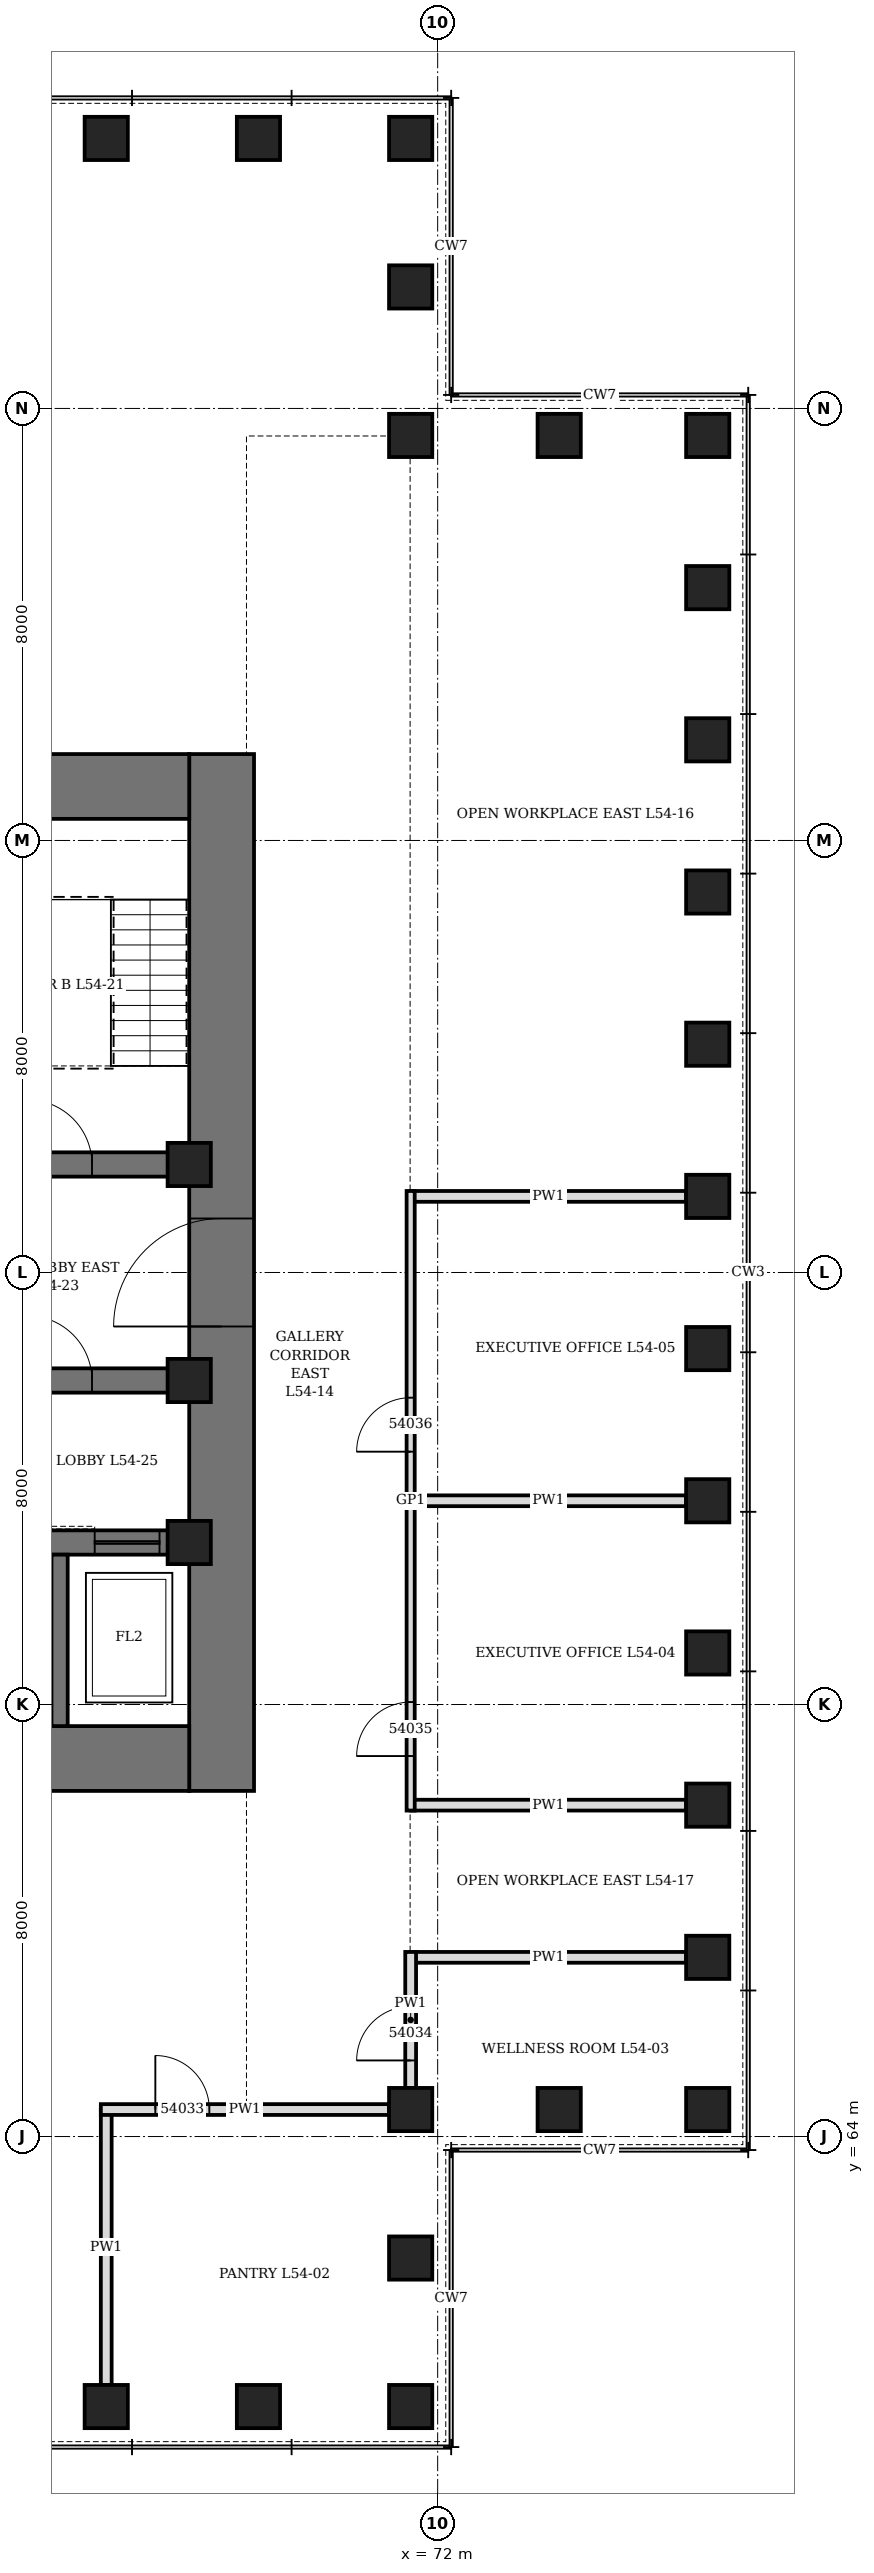
"""IFC4 building model, lengths in metres.
Left out: names, types, materials, properties, quantities, classifications, styles, units other than length and angle.
Written with IfcOpenShell. Run it as: python <this file> out.ifc"""

import sys

from ifc_helpers import new_model, si_unit, direction, frame, frame_2d, origin, origin_2d, place, context, subcontext, project, spatial, rectangle, hollow_rectangle, extrude, element, fill, save


model = new_model("IFC4")
c1 = context("Model", 3, precision=1e-05, world=origin(), true_north=direction((0.0, 1.0)))
c2 = subcontext(c1, "Body", "Model", "MODEL_VIEW")
j1 = project(units=[si_unit("LENGTHUNIT", "METRE"), si_unit("PLANEANGLEUNIT", "RADIAN")], contexts=[c1])
p1 = place(None, origin())
s1 = spatial("IfcSite", under=j1, at=p1, CompositionType="ELEMENT")
p2 = place(p1, origin())
s2 = spatial("IfcBuilding", under=s1, at=p2, CompositionType="ELEMENT")
p3 = place(p2, frame((0.0, 0.0, 240.1)))
s3 = spatial("IfcBuildingStorey", under=s2, at=p3, CompositionType="ELEMENT", Elevation=240.1)
for number, where, z_axis, x_axis in (
    (1, (65.864, 59.0, 0.0), (0.0, 0.0, 1.0), (1.0, 0.0, 0.0)),
    (2, (68.682, 59.0, 0.0), (0.0, 0.0, 1.0), (1.0, 0.0, 0.0)),
    (3, (71.5, 59.0, 0.0), (0.0, 0.0, 1.0), (0.0, 1.0, 0.0)),
    (4, (71.5, 61.75, 0.0), (0.0, 0.0, 1.0), (0.0, 1.0, 0.0)),
    (5, (71.5, 64.5, 0.0), (0.0, 0.0, 1.0), (1.0, 0.0, 0.0)),
    (6, (74.25, 64.5, 0.0), (0.0, 0.0, 1.0), (1.0, 0.0, 0.0)),
    (7, (77.0, 64.5, 0.0), (0.0, 0.0, 1.0), (0.0, 1.0, 0.0)),
    (8, (77.0, 67.318, 0.0), (0.0, 0.0, 1.0), (0.0, 1.0, 0.0)),
    (9, (77.0, 70.136, 0.0), (0.0, 0.0, 1.0), (0.0, 1.0, 0.0)),
    (10, (77.0, 72.955, 0.0), (0.0, 0.0, 1.0), (0.0, 1.0, 0.0)),
    (11, (77.0, 75.773, 0.0), (0.0, 0.0, 1.0), (0.0, 1.0, 0.0)),
    (12, (77.0, 78.591, 0.0), (0.0, 0.0, 1.0), (0.0, 1.0, 0.0)),
    (13, (77.0, 81.409, 0.0), (0.0, 0.0, 1.0), (0.0, 1.0, 0.0)),
    (14, (77.0, 84.227, 0.0), (0.0, 0.0, 1.0), (0.0, 1.0, 0.0)),
    (15, (77.0, 87.045, 0.0), (0.0, 0.0, 1.0), (0.0, 1.0, 0.0)),
    (16, (77.0, 89.864, 0.0), (0.0, 0.0, 1.0), (0.0, 1.0, 0.0)),
    (17, (77.0, 92.682, 0.0), (0.0, 0.0, 1.0), (0.0, 1.0, 0.0)),
    (18, (77.0, 95.5, 0.0), (0.0, 0.0, 1.0), (1.0, 0.0, 0.0)),
    (19, (74.25, 95.5, 0.0), (0.0, 0.0, 1.0), (1.0, 0.0, 0.0)),
    (20, (71.5, 95.5, 0.0), (0.0, 0.0, 1.0), (0.0, 1.0, 0.0)),
    (21, (71.5, 98.25, 0.0), (0.0, 0.0, 1.0), (0.0, 1.0, 0.0)),
    (22, (71.5, 101.0, 0.0), (0.0, 0.0, 1.0), (1.0, 0.0, 0.0)),
    (23, (68.682, 101.0, 0.0), (0.0, 0.0, 1.0), (1.0, 0.0, 0.0)),
    (24, (65.864, 101.0, 0.0), (0.0, 0.0, 1.0), (1.0, 0.0, 0.0)),
):
    element("IfcColumn", number, at=place(p3, frame(where, z_axis=z_axis, x_axis=x_axis)), inside=s3, PredefinedType="COLUMN", context=c2, shape_type="SweptSolid", body=[
        extrude(hollow_rectangle(XDim=0.8, YDim=0.8, WallThickness=0.08, at=origin_2d()), origin(), (0.0, 0.0, 1.0), 4.2),
    ])
p4 = place(p3, frame((68.0, 70.4, 0.0), z_axis=(0.0, 0.0, 1.0), x_axis=(0.0, 1.0, 0.0)))
e25 = element("IfcWall", 25, at=p4, inside=s3, PredefinedType="SHEAR", context=c2, shape_type="SweptSolid", body=[
    extrude(rectangle(XDim=19.2, YDim=1.2, at=frame_2d((9.6, 0.0))), origin(), (0.0, 0.0, 1.0), 4.2),
])
p5 = place(p4, frame((8.6, 0.0, 0.0)))
e26 = element("IfcOpeningElement", 26, at=p5, cuts=e25, PredefinedType="OPENING", context=c2, shape_type="SweptSolid", body=[
    extrude(rectangle(XDim=2.0, YDim=2.4, at=frame_2d((1.0, 1.2))), frame((0.0, 0.61, 0.0), z_axis=(0.0, -1.0, 0.0), x_axis=(1.0, 0.0, 0.0)), (0.0, 0.0, 1.0), 1.22),
])
p6 = place(p3, frame((44.6, 71.0, 0.0), z_axis=(0.0, 0.0, 1.0), x_axis=(1.0, 0.0, 0.0)))
e27 = element("IfcWall", 27, at=p6, inside=s3, PredefinedType="SHEAR", context=c2, shape_type="SweptSolid", body=[
    extrude(rectangle(XDim=22.8, YDim=1.2, at=frame_2d((11.4, 0.0))), origin(), (0.0, 0.0, 1.0), 4.2),
])
p7 = place(p6, frame((6.35, 0.0, 0.0)))
e28 = element("IfcOpeningElement", 28, at=p7, cuts=e27, PredefinedType="OPENING", context=c2, shape_type="SweptSolid", body=[
    extrude(rectangle(XDim=1.1, YDim=2.2, at=frame_2d((0.55, 1.1))), frame((0.0, 0.61, 0.0), z_axis=(0.0, -1.0, 0.0), x_axis=(1.0, 0.0, 0.0)), (0.0, 0.0, 1.0), 1.22),
])
p8 = place(p6, frame((9.35, 0.0, 0.0)))
e29 = element("IfcOpeningElement", 29, at=p8, cuts=e27, PredefinedType="OPENING", context=c2, shape_type="SweptSolid", body=[
    extrude(rectangle(XDim=1.1, YDim=2.2, at=frame_2d((0.55, 1.1))), frame((0.0, 0.61, 0.0), z_axis=(0.0, -1.0, 0.0), x_axis=(1.0, 0.0, 0.0)), (0.0, 0.0, 1.0), 1.22),
])
p9 = place(p6, frame((12.35, 0.0, 0.0)))
e30 = element("IfcOpeningElement", 30, at=p9, cuts=e27, PredefinedType="OPENING", context=c2, shape_type="SweptSolid", body=[
    extrude(rectangle(XDim=1.1, YDim=2.2, at=frame_2d((0.55, 1.1))), frame((0.0, 0.61, 0.0), z_axis=(0.0, -1.0, 0.0), x_axis=(1.0, 0.0, 0.0)), (0.0, 0.0, 1.0), 1.22),
])
p10 = place(p6, frame((15.35, 0.0, 0.0)))
e31 = element("IfcOpeningElement", 31, at=p10, cuts=e27, PredefinedType="OPENING", context=c2, shape_type="SweptSolid", body=[
    extrude(rectangle(XDim=1.1, YDim=2.2, at=frame_2d((0.55, 1.1))), frame((0.0, 0.61, 0.0), z_axis=(0.0, -1.0, 0.0), x_axis=(1.0, 0.0, 0.0)), (0.0, 0.0, 1.0), 1.22),
])
p11 = place(p3, frame((44.6, 89.0, 0.0), z_axis=(0.0, 0.0, 1.0), x_axis=(1.0, 0.0, 0.0)))
e32 = element("IfcWall", 32, at=p11, inside=s3, PredefinedType="SHEAR", context=c2, shape_type="SweptSolid", body=[
    extrude(rectangle(XDim=22.8, YDim=1.2, at=frame_2d((11.4, 0.0))), origin(), (0.0, 0.0, 1.0), 4.2),
])
p12 = place(p11, frame((9.275, 0.0, 0.0)))
e33 = element("IfcOpeningElement", 33, at=p12, cuts=e32, PredefinedType="OPENING", context=c2, shape_type="SweptSolid", body=[
    extrude(rectangle(XDim=1.0, YDim=2.1, at=frame_2d((0.5, 1.05))), frame((0.0, 0.61, 0.0), z_axis=(0.0, -1.0, 0.0), x_axis=(1.0, 0.0, 0.0)), (0.0, 0.0, 1.0), 1.22),
])
p13 = place(p11, frame((6.45, 0.0, 0.0)))
e34 = element("IfcOpeningElement", 34, at=p13, cuts=e32, PredefinedType="OPENING", context=c2, shape_type="SweptSolid", body=[
    extrude(rectangle(XDim=0.9, YDim=2.1, at=frame_2d((0.45, 1.05))), frame((0.0, 0.61, 0.0), z_axis=(0.0, -1.0, 0.0), x_axis=(1.0, 0.0, 0.0)), (0.0, 0.0, 1.0), 1.22),
])
p14 = place(p11, frame((13.012, 0.0, 0.0)))
e35 = element("IfcOpeningElement", 35, at=p14, cuts=e32, PredefinedType="OPENING", context=c2, shape_type="SweptSolid", body=[
    extrude(rectangle(XDim=0.9, YDim=2.1, at=frame_2d((0.45, 1.05))), frame((0.0, 0.61, 0.0), z_axis=(0.0, -1.0, 0.0), x_axis=(1.0, 0.0, 0.0)), (0.0, 0.0, 1.0), 1.22),
])
p15 = place(p3, frame((62.225, 75.0, 0.0), z_axis=(0.0, 0.0, 1.0), x_axis=(1.0, 0.0, 0.0)))
e36 = element("IfcWall", 36, at=p15, inside=s3, PredefinedType="SHEAR", context=c2, shape_type="SweptSolid", body=[
    extrude(rectangle(XDim=5.175, YDim=0.45, at=frame_2d((2.587, 0.0))), origin(), (0.0, 0.0, 1.0), 4.2),
])
p16 = place(p15, frame((0.675, 0.0, 0.0)))
e37 = element("IfcOpeningElement", 37, at=p16, cuts=e36, PredefinedType="OPENING", context=c2, shape_type="SweptSolid", body=[
    extrude(rectangle(XDim=1.2, YDim=2.2, at=frame_2d((0.6, 1.1))), frame((0.0, 0.235, 0.0), z_axis=(0.0, -1.0, 0.0), x_axis=(1.0, 0.0, 0.0)), (0.0, 0.0, 1.0), 0.47),
])
p17 = place(p15, frame((3.425, 0.0, 0.0)))
e38 = element("IfcOpeningElement", 38, at=p17, cuts=e36, PredefinedType="OPENING", context=c2, shape_type="SweptSolid", body=[
    extrude(rectangle(XDim=1.2, YDim=2.2, at=frame_2d((0.6, 1.1))), frame((0.0, 0.235, 0.0), z_axis=(0.0, -1.0, 0.0), x_axis=(1.0, 0.0, 0.0)), (0.0, 0.0, 1.0), 0.47),
])
p18 = place(p3, frame((62.225, 78.0, 0.0), z_axis=(0.0, 0.0, 1.0), x_axis=(1.0, 0.0, 0.0)))
e39 = element("IfcWall", 39, at=p18, inside=s3, PredefinedType="SHEAR", context=c2, shape_type="SweptSolid", body=[
    extrude(rectangle(XDim=5.175, YDim=0.45, at=frame_2d((2.587, 0.0))), origin(), (0.0, 0.0, 1.0), 4.2),
])
p19 = place(p18, frame((2.175, 0.0, 0.0)))
e40 = element("IfcOpeningElement", 40, at=p19, cuts=e39, PredefinedType="OPENING", context=c2, shape_type="SweptSolid", body=[
    extrude(rectangle(XDim=1.2, YDim=2.1, at=frame_2d((0.6, 1.05))), frame((0.0, 0.235, 0.0), z_axis=(0.0, -1.0, 0.0), x_axis=(1.0, 0.0, 0.0)), (0.0, 0.0, 1.0), 0.47),
])
p20 = place(p3, frame((62.225, 82.0, 0.0), z_axis=(0.0, 0.0, 1.0), x_axis=(1.0, 0.0, 0.0)))
e41 = element("IfcWall", 41, at=p20, inside=s3, PredefinedType="SHEAR", context=c2, shape_type="SweptSolid", body=[
    extrude(rectangle(XDim=5.175, YDim=0.45, at=frame_2d((2.587, 0.0))), origin(), (0.0, 0.0, 1.0), 4.2),
])
p21 = place(p20, frame((2.175, 0.0, 0.0)))
e42 = element("IfcOpeningElement", 42, at=p21, cuts=e41, PredefinedType="OPENING", context=c2, shape_type="SweptSolid", body=[
    extrude(rectangle(XDim=1.2, YDim=2.1, at=frame_2d((0.6, 1.05))), frame((0.0, 0.235, 0.0), z_axis=(0.0, -1.0, 0.0), x_axis=(1.0, 0.0, 0.0)), (0.0, 0.0, 1.0), 0.47),
])
p22 = place(p3, frame((65.0, 71.6, 0.0), z_axis=(0.0, 0.0, 1.0), x_axis=(0.0, 1.0, 0.0)))
e43 = element("IfcWall", 43, at=p22, inside=s3, PredefinedType="SHEAR", context=c2, shape_type="SweptSolid", body=[
    extrude(rectangle(XDim=3.175, YDim=0.3, at=frame_2d((1.587, 0.0))), origin(), (0.0, 0.0, 1.0), 4.2),
])
for number, where, z_axis, x_axis in (
    (44, (67.4, 75.0, 0.0), (0.0, 0.0, 1.0), (1.0, 0.0, 0.0)),
    (45, (67.4, 78.0, 0.0), (0.0, 0.0, 1.0), (1.0, 0.0, 0.0)),
    (46, (67.4, 82.0, 0.0), (0.0, 0.0, 1.0), (1.0, 0.0, 0.0)),
):
    element("IfcColumn", number, at=place(p3, frame(where, z_axis=z_axis, x_axis=x_axis)), inside=s3, PredefinedType="COLUMN", context=c2, shape_type="SweptSolid", body=[
        extrude(hollow_rectangle(XDim=0.8, YDim=0.8, WallThickness=0.1, at=origin_2d()), origin(), (0.0, 0.0, 1.0), 4.2),
    ])
for number, where, z_axis, x_axis in (
    (47, (65.864, 59.4, 0.0), (0.0, 0.0, 1.0), (0.0, 1.0, 0.0)),
    (48, (71.5, 67.318, 0.0), (0.0, 0.0, 1.0), (1.0, 0.0, 0.0)),
    (49, (71.5, 70.136, 0.0), (0.0, 0.0, 1.0), (1.0, 0.0, 0.0)),
    (50, (71.5, 75.773, 0.0), (0.0, 0.0, 1.0), (1.0, 0.0, 0.0)),
    (51, (71.5, 81.409, 0.0), (0.0, 0.0, 1.0), (1.0, 0.0, 0.0)),
):
    element("IfcWall", number, at=place(p3, frame(where, z_axis=z_axis, x_axis=x_axis)), inside=s3, PredefinedType="PARTITIONING", context=c2, shape_type="SweptSolid", body=[
        extrude(rectangle(XDim=5.1, YDim=0.2, at=frame_2d((2.55, 0.0))), origin(), (0.0, 0.0, 1.0), 3.188),
    ])
p23 = place(p3, frame((65.764, 64.5, 0.0), z_axis=(0.0, 0.0, 1.0), x_axis=(1.0, 0.0, 0.0)))
e52 = element("IfcWall", 52, at=p23, inside=s3, PredefinedType="PARTITIONING", context=c2, shape_type="SweptSolid", body=[
    extrude(rectangle(XDim=5.336, YDim=0.2, at=frame_2d((2.668, 0.0))), origin(), (0.0, 0.0, 1.0), 3.95),
])
p24 = place(p23, frame((1.009, 0.0, 0.0)))
e53 = element("IfcOpeningElement", 53, at=p24, cuts=e52, PredefinedType="OPENING", context=c2, shape_type="SweptSolid", body=[
    extrude(rectangle(XDim=1.0, YDim=2.1, at=frame_2d((0.5, 1.05))), frame((0.0, 0.11, 0.0), z_axis=(0.0, -1.0, 0.0), x_axis=(1.0, 0.0, 0.0)), (0.0, 0.0, 1.0), 0.22),
])
p25 = place(p3, frame((71.5, 70.036, 0.0), z_axis=(0.0, 0.0, 1.0), x_axis=(0.0, 1.0, 0.0)))
e54 = element("IfcWall", 54, at=p25, inside=s3, PredefinedType="PARTITIONING", context=c2, shape_type="SweptSolid", body=[
    extrude(rectangle(XDim=11.473, YDim=0.15, at=frame_2d((5.736, 0.0))), origin(), (0.0, 0.0, 1.0), 3.95),
])
p26 = place(p25, frame((1.009, 0.0, 0.0)))
e55 = element("IfcOpeningElement", 55, at=p26, cuts=e54, PredefinedType="OPENING", context=c2, shape_type="SweptSolid", body=[
    extrude(rectangle(XDim=1.0, YDim=2.1, at=frame_2d((0.5, 1.05))), frame((0.0, 0.085, 0.0), z_axis=(0.0, -1.0, 0.0), x_axis=(1.0, 0.0, 0.0)), (0.0, 0.0, 1.0), 0.17),
])
p27 = place(p25, frame((6.646, 0.0, 0.0)))
e56 = element("IfcOpeningElement", 56, at=p27, cuts=e54, PredefinedType="OPENING", context=c2, shape_type="SweptSolid", body=[
    extrude(rectangle(XDim=1.0, YDim=2.1, at=frame_2d((0.5, 1.05))), frame((0.0, 0.085, 0.0), z_axis=(0.0, -1.0, 0.0), x_axis=(1.0, 0.0, 0.0)), (0.0, 0.0, 1.0), 0.17),
])
p28 = place(p3, frame((71.5, 64.9, 0.0), z_axis=(0.0, 0.0, 1.0), x_axis=(0.0, 1.0, 0.0)))
e57 = element("IfcWall", 57, at=p28, inside=s3, PredefinedType="PARTITIONING", context=c2, shape_type="SweptSolid", body=[
    extrude(rectangle(XDim=2.518, YDim=0.2, at=frame_2d((1.259, 0.0))), origin(), (0.0, 0.0, 1.0), 3.95),
])
p29 = place(p28, frame((0.509, 0.0, 0.0)))
e58 = element("IfcOpeningElement", 58, at=p29, cuts=e57, PredefinedType="OPENING", context=c2, shape_type="SweptSolid", body=[
    extrude(rectangle(XDim=1.0, YDim=2.1, at=frame_2d((0.5, 1.05))), frame((0.0, 0.11, 0.0), z_axis=(0.0, -1.0, 0.0), x_axis=(1.0, 0.0, 0.0)), (0.0, 0.0, 1.0), 0.22),
])
p30 = place(p21, origin())
e59 = element("IfcDoor", 59, at=p30, inside=s3, OperationType="SINGLE_SWING_LEFT", PredefinedType="DOOR", context=c2, shape_type="SweptSolid", body=[
    extrude(rectangle(XDim=1.2, YDim=2.1, at=frame_2d((0.6, 1.05))), frame((0.0, 0.225, 0.0), z_axis=(0.0, -1.0, 0.0), x_axis=(1.0, 0.0, 0.0)), (0.0, 0.0, 1.0), 0.449),
])
fill(e42, e59)
p31 = place(p5, origin())
e60 = element("IfcDoor", 60, at=p31, inside=s3, OperationType="DOUBLE_DOOR_SINGLE_SWING", PredefinedType="DOOR", context=c2, shape_type="SweptSolid", body=[
    extrude(rectangle(XDim=2.0, YDim=2.4, at=frame_2d((1.0, 1.2))), frame((0.0, 0.35, 0.0), z_axis=(0.0, -1.0, 0.0), x_axis=(1.0, 0.0, 0.0)), (0.0, 0.0, 1.0), 0.7),
])
fill(e26, e60)
p32 = place(p19, origin())
e61 = element("IfcDoor", 61, at=p32, inside=s3, OperationType="SINGLE_SWING_RIGHT", PredefinedType="DOOR", context=c2, shape_type="SweptSolid", body=[
    extrude(rectangle(XDim=1.2, YDim=2.1, at=frame_2d((0.6, 1.05))), frame((0.0, 0.225, 0.0), z_axis=(0.0, -1.0, 0.0), x_axis=(1.0, 0.0, 0.0)), (0.0, 0.0, 1.0), 0.449),
])
fill(e40, e61)
p33 = place(p17, origin())
e62 = element("IfcDoor", 62, at=p33, inside=s3, OperationType="SLIDING_TO_LEFT", PredefinedType="DOOR", context=c2, shape_type="SweptSolid", body=[
    extrude(rectangle(XDim=1.2, YDim=2.2, at=frame_2d((0.6, 1.1))), frame((0.0, 0.225, 0.0), z_axis=(0.0, -1.0, 0.0), x_axis=(1.0, 0.0, 0.0)), (0.0, 0.0, 1.0), 0.449),
])
fill(e38, e62)
p34 = place(p24, origin())
e63 = element("IfcDoor", 63, at=p34, inside=s3, OperationType="SINGLE_SWING_LEFT", PredefinedType="DOOR", context=c2, shape_type="SweptSolid", body=[
    extrude(rectangle(XDim=1.0, YDim=2.1, at=frame_2d((0.5, 1.05))), frame((0.0, 0.1, 0.0), z_axis=(0.0, -1.0, 0.0), x_axis=(1.0, 0.0, 0.0)), (0.0, 0.0, 1.0), 0.199),
])
fill(e53, e63)
p35 = place(p29, origin())
e64 = element("IfcDoor", 64, at=p35, inside=s3, OperationType="SINGLE_SWING_LEFT", PredefinedType="DOOR", context=c2, shape_type="SweptSolid", body=[
    extrude(rectangle(XDim=1.0, YDim=2.1, at=frame_2d((0.5, 1.05))), frame((0.0, 0.1, 0.0), z_axis=(0.0, -1.0, 0.0), x_axis=(1.0, 0.0, 0.0)), (0.0, 0.0, 1.0), 0.199),
])
fill(e58, e64)
p36 = place(p26, origin())
e65 = element("IfcDoor", 65, at=p36, inside=s3, OperationType="SINGLE_SWING_LEFT", PredefinedType="DOOR", context=c2, shape_type="SweptSolid", body=[
    extrude(rectangle(XDim=1.0, YDim=2.1, at=frame_2d((0.5, 1.05))), frame((0.0, 0.075, 0.0), z_axis=(0.0, -1.0, 0.0), x_axis=(1.0, 0.0, 0.0)), (0.0, 0.0, 1.0), 0.149),
])
fill(e55, e65)
p37 = place(p27, origin())
e66 = element("IfcDoor", 66, at=p37, inside=s3, OperationType="SINGLE_SWING_LEFT", PredefinedType="DOOR", context=c2, shape_type="SweptSolid", body=[
    extrude(rectangle(XDim=1.0, YDim=2.1, at=frame_2d((0.5, 1.05))), frame((0.0, 0.075, 0.0), z_axis=(0.0, -1.0, 0.0), x_axis=(1.0, 0.0, 0.0)), (0.0, 0.0, 1.0), 0.149),
])
fill(e56, e66)
save(model, sys.argv[1])
